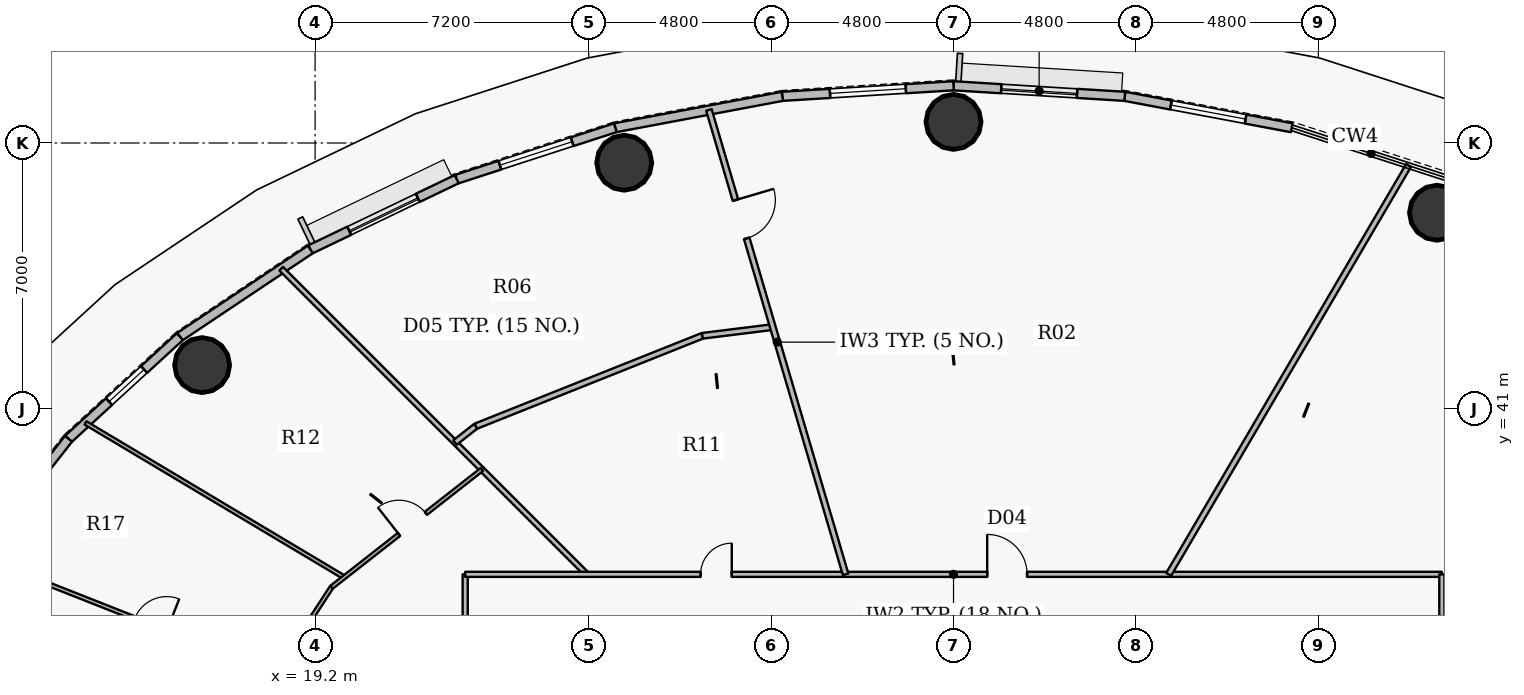
"""IFC4 building model, lengths in metres.
Left out: names, types, materials, properties, quantities, classifications, styles, units other than length and angle.
Written with IfcOpenShell. Run it as: python <this file> out.ifc"""

import sys

from ifc_helpers import new_model, si_unit, direction, frame, frame_2d, origin, origin_2d, place, context, subcontext, project, spatial, rectangle, hollow_circle, extrude, source, transform, mapped, element, fill, save


model = new_model("IFC4")
c1 = context("Model", 3, precision=1e-05, world=origin(), true_north=direction((0.0, 1.0)))
c2 = subcontext(c1, "Body", "Model", "MODEL_VIEW")
j1 = project(units=[si_unit("LENGTHUNIT", "METRE"), si_unit("PLANEANGLEUNIT", "RADIAN")], contexts=[c1])
p1 = place(None, origin())
s1 = spatial("IfcSite", under=j1, at=p1, CompositionType="ELEMENT")
p2 = place(p1, origin())
s2 = spatial("IfcBuilding", under=s1, at=p2, CompositionType="ELEMENT")
p3 = place(p2, frame((0.0, 0.0, 92.4)))
s3 = spatial("IfcBuildingStorey", under=s2, at=p3, CompositionType="ELEMENT", Elevation=92.4)
for number, where, z_axis, x_axis in (
    (1, (48.722, 46.165, -0.3), (0.0, 0.0, 1.0), (1.0, 0.0, 0.0)),
    (2, (36.0, 48.555, -0.3), (0.0, 0.0, 1.0), (1.0, 0.0, 0.0)),
    (3, (27.334, 47.481, -0.3), (0.0, 0.0, 1.0), (1.0, 0.0, 0.0)),
    (4, (16.227, 42.156, -0.3), (0.0, 0.0, 1.0), (1.0, 0.0, 0.0)),
):
    element("IfcColumn", number, at=place(p3, frame(where, z_axis=z_axis, x_axis=x_axis)), inside=s3, PredefinedType="COLUMN", context=c2, shape_type="SweptSolid", body=[
        extrude(hollow_circle(Radius=0.725, WallThickness=0.042, at=origin_2d()), origin(), (0.0, 0.0, 1.0), 5.1),
    ])
p4 = place(p3, frame((40.506, 49.227, 0.0), z_axis=(0.0, 0.0, 1.0), x_axis=(0.982789252177, -0.184730305596, 0.0)))
e5 = element("IfcWall", 5, at=p4, inside=s3, PredefinedType="SOLIDWALL", context=c2, shape_type="SweptSolid", body=[
    extrude(rectangle(XDim=4.471, YDim=0.24, at=frame_2d((2.235, 0.0))), origin(), (0.0, 0.0, 1.0), 4.55),
])
p5 = place(p4, frame((1.236, 0.0, 0.9)))
e6 = element("IfcOpeningElement", 6, at=p5, cuts=e5, PredefinedType="OPENING", context=c2, shape_type="SweptSolid", body=[
    extrude(rectangle(XDim=2.0, YDim=1.75, at=origin_2d()), frame((1.0, 0.13, 0.875), z_axis=(0.0, -1.0, 0.0), x_axis=(1.0, 0.0, 0.0)), (0.0, 0.0, 1.0), 0.26),
])
p6 = place(p3, frame((36.0, 49.505, 0.0), z_axis=(0.0, 0.0, 1.0), x_axis=(0.998107531589, -0.061492726276, 0.0)))
e7 = element("IfcWall", 7, at=p6, inside=s3, PredefinedType="SOLIDWALL", context=c2, shape_type="SweptSolid", body=[
    extrude(rectangle(XDim=4.514, YDim=0.24, at=frame_2d((2.257, 0.0))), origin(), (0.0, 0.0, 1.0), 4.55),
])
p7 = place(p6, frame((1.257, 0.0, 0.9)))
e8 = element("IfcOpeningElement", 8, at=p7, cuts=e7, PredefinedType="OPENING", context=c2, shape_type="SweptSolid", body=[
    extrude(rectangle(XDim=2.0, YDim=1.75, at=origin_2d()), frame((1.0, 0.13, 0.875), z_axis=(0.0, -1.0, 0.0), x_axis=(1.0, 0.0, 0.0)), (0.0, 0.0, 1.0), 0.26),
])
p8 = place(p3, frame((31.494, 49.227, 0.0), z_axis=(0.0, 0.0, 1.0), x_axis=(0.998107531589, 0.061492726276, 0.0)))
e9 = element("IfcWall", 9, at=p8, inside=s3, PredefinedType="SOLIDWALL", context=c2, shape_type="SweptSolid", body=[
    extrude(rectangle(XDim=4.514, YDim=0.24, at=frame_2d((2.257, 0.0))), origin(), (0.0, 0.0, 1.0), 4.55),
])
p9 = place(p8, frame((1.257, 0.0, 0.9)))
e10 = element("IfcOpeningElement", 10, at=p9, cuts=e9, PredefinedType="OPENING", context=c2, shape_type="SweptSolid", body=[
    extrude(rectangle(XDim=2.0, YDim=1.75, at=origin_2d()), frame((1.0, 0.13, 0.875), z_axis=(0.0, -1.0, 0.0), x_axis=(1.0, 0.0, 0.0)), (0.0, 0.0, 1.0), 0.26),
])
p10 = place(p3, frame((27.1, 48.401, 0.0), z_axis=(0.0, 0.0, 1.0), x_axis=(0.982789252177, 0.184730305596, 0.0)))
e11 = element("IfcWall", 11, at=p10, inside=s3, PredefinedType="SOLIDWALL", context=c2, shape_type="SweptSolid", body=[
    extrude(rectangle(XDim=4.471, YDim=0.24, at=frame_2d((2.235, 0.0))), origin(), (0.0, 0.0, 1.0), 4.55),
])
p11 = place(p3, frame((22.926, 47.047, 0.0), z_axis=(0.0, 0.0, 1.0), x_axis=(0.951211346073, 0.308540070495, 0.0)))
e12 = element("IfcWall", 12, at=p11, inside=s3, PredefinedType="SOLIDWALL", context=c2, shape_type="SweptSolid", body=[
    extrude(rectangle(XDim=4.388, YDim=0.24, at=frame_2d((2.194, 0.0))), origin(), (0.0, 0.0, 1.0), 4.55),
])
p12 = place(p11, frame((1.194, 0.0, 0.9)))
e13 = element("IfcOpeningElement", 13, at=p12, cuts=e12, PredefinedType="OPENING", context=c2, shape_type="SweptSolid", body=[
    extrude(rectangle(XDim=2.0, YDim=1.75, at=origin_2d()), frame((1.0, 0.13, 0.875), z_axis=(0.0, -1.0, 0.0), x_axis=(1.0, 0.0, 0.0)), (0.0, 0.0, 1.0), 0.26),
])
p13 = place(p3, frame((19.075, 45.199, 0.0), z_axis=(0.0, 0.0, 1.0), x_axis=(0.901589935876, 0.432591709962, 0.0)))
e14 = element("IfcWall", 14, at=p13, inside=s3, PredefinedType="SOLIDWALL", context=c2, shape_type="SweptSolid", body=[
    extrude(rectangle(XDim=4.272, YDim=0.24, at=frame_2d((2.136, 0.0))), origin(), (0.0, 0.0, 1.0), 4.55),
])
p14 = place(p13, frame((1.136, 0.0, 0.9)))
e15 = element("IfcOpeningElement", 15, at=p14, cuts=e14, PredefinedType="OPENING", context=c2, shape_type="SweptSolid", body=[
    extrude(rectangle(XDim=2.0, YDim=1.75, at=origin_2d()), frame((1.0, 0.13, 0.875), z_axis=(0.0, -1.0, 0.0), x_axis=(1.0, 0.0, 0.0)), (0.0, 0.0, 1.0), 0.26),
])
p15 = place(p3, frame((15.642, 42.903, 0.0), z_axis=(0.0, 0.0, 1.0), x_axis=(0.831221811447, 0.555940914284, 0.0)))
e16 = element("IfcWall", 16, at=p15, inside=s3, PredefinedType="SOLIDWALL", context=c2, shape_type="SweptSolid", body=[
    extrude(rectangle(XDim=4.13, YDim=0.24, at=frame_2d((2.065, 0.0))), origin(), (0.0, 0.0, 1.0), 4.55),
])
p16 = place(p3, frame((12.711, 40.217, 0.0), z_axis=(0.0, 0.0, 1.0), x_axis=(0.737113356241, 0.675769117414, 0.0)))
e17 = element("IfcWall", 17, at=p16, inside=s3, PredefinedType="SOLIDWALL", context=c2, shape_type="SweptSolid", body=[
    extrude(rectangle(XDim=3.976, YDim=0.24, at=frame_2d((1.988, 0.0))), origin(), (0.0, 0.0, 1.0), 4.55),
])
p17 = place(p16, frame((1.447, 0.0, 0.9)))
e18 = element("IfcOpeningElement", 18, at=p17, cuts=e17, PredefinedType="OPENING", context=c2, shape_type="SweptSolid", body=[
    extrude(rectangle(XDim=1.25, YDim=1.65, at=origin_2d()), frame((0.625, 0.13, 0.825), z_axis=(0.0, -1.0, 0.0), x_axis=(1.0, 0.0, 0.0)), (0.0, 0.0, 1.0), 0.26),
])
p18 = place(p3, frame((10.355, 37.206, 0.0), z_axis=(0.0, 0.0, 1.0), x_axis=(0.616272103517, 0.787533297345, 0.0)))
e19 = element("IfcWall", 19, at=p18, inside=s3, PredefinedType="SOLIDWALL", context=c2, shape_type="SweptSolid", body=[
    extrude(rectangle(XDim=3.823, YDim=0.24, at=frame_2d((1.912, 0.0))), origin(), (0.0, 0.0, 1.0), 4.55),
])
p19 = place(p3, frame((10.309, 37.131, 0.0), z_axis=(0.0, 0.0, 1.0), x_axis=(0.930286568853, -0.366833613251, 0.0)))
e20 = element("IfcWall", 20, at=p19, inside=s3, PredefinedType="PARTITIONING", context=c2, shape_type="SweptSolid", body=[
    extrude(rectangle(XDim=8.432, YDim=0.1, at=frame_2d((4.216, 0.0))), origin(), (0.0, 0.0, 1.0), 3.985),
])
p20 = place(p19, frame((4.459, 0.0, 0.0)))
e21 = element("IfcOpeningElement", 21, at=p20, cuts=e20, PredefinedType="OPENING", context=c2, shape_type="SweptSolid", body=[
    extrude(rectangle(XDim=0.9, YDim=2.1, at=origin_2d()), frame((0.45, 0.06, 1.05), z_axis=(0.0, -1.0, 0.0), x_axis=(1.0, 0.0, 0.0)), (0.0, 0.0, 1.0), 0.12),
])
p21 = place(p3, frame((13.159, 40.634, 0.0), z_axis=(0.0, 0.0, 1.0), x_axis=(0.858651150201, -0.512560437664, 0.0)))
e22 = element("IfcWall", 22, at=p21, inside=s3, PredefinedType="PARTITIONING", context=c2, shape_type="SweptSolid", body=[
    extrude(rectangle(XDim=7.927, YDim=0.1, at=frame_2d((3.963, 0.0))), origin(), (0.0, 0.0, 1.0), 3.985),
])
p22 = place(p3, frame((18.154, 34.037, 0.0), z_axis=(0.0, 0.0, 1.0), x_axis=(0.545361556746, 0.838200914115, 0.0)))
e23 = element("IfcWall", 23, at=p22, inside=s3, PredefinedType="PARTITIONING", context=c2, shape_type="SweptSolid", body=[
    extrude(rectangle(XDim=2.713, YDim=0.1, at=frame_2d((1.356, 0.0))), origin(), (0.0, 0.0, 1.0), 3.985),
])
p23 = place(p3, frame((18.308, 44.692, 0.0), z_axis=(0.0, 0.0, 1.0), x_axis=(0.707106781187, -0.707106781187, 0.0)))
e24 = element("IfcWall", 24, at=p23, inside=s3, PredefinedType="PARTITIONING", context=c2, shape_type="SweptSolid", body=[
    extrude(rectangle(XDim=11.374, YDim=0.135, at=frame_2d((5.687, 0.0))), origin(), (0.0, 0.0, 1.0), 3.985),
])
p24 = place(p3, frame((19.634, 36.311, 0.0), z_axis=(0.0, 0.0, 1.0), x_axis=(0.787333773608, 0.616526989625, 0.0)))
e25 = element("IfcWall", 25, at=p24, inside=s3, PredefinedType="PARTITIONING", context=c2, shape_type="SweptSolid", body=[
    extrude(rectangle(XDim=5.026, YDim=0.1, at=frame_2d((2.513, 0.0))), origin(), (0.0, 0.0, 1.0), 3.985),
])
p25 = place(p24, frame((2.254, 0.0, 0.0)))
e26 = element("IfcOpeningElement", 26, at=p25, cuts=e25, PredefinedType="OPENING", context=c2, shape_type="SweptSolid", body=[
    extrude(rectangle(XDim=0.9, YDim=2.1, at=origin_2d()), frame((0.45, 0.06, 1.05), z_axis=(0.0, -1.0, 0.0), x_axis=(1.0, 0.0, 0.0)), (0.0, 0.0, 1.0), 0.12),
])
p26 = place(p3, frame((22.881, 40.119, 0.0), z_axis=(0.0, 0.0, 1.0), x_axis=(0.787460608079, 0.616364981747, 0.0)))
e27 = element("IfcWall", 27, at=p26, inside=s3, PredefinedType="PARTITIONING", context=c2, shape_type="SweptSolid", body=[
    extrude(rectangle(XDim=0.696, YDim=0.15, at=frame_2d((0.348, 0.0))), origin(), (0.0, 0.0, 1.0), 4.55),
])
p27 = place(p3, frame((23.15, 17.35, 0.0), z_axis=(0.0, 0.0, 1.0), x_axis=(0.0, 1.0, 0.0)))
e28 = element("IfcWall", 28, at=p27, inside=s3, PredefinedType="PARTITIONING", context=c2, shape_type="SweptSolid", body=[
    extrude(rectangle(XDim=19.3, YDim=0.135, at=frame_2d((9.65, 0.0))), origin(), (0.0, 0.0, 1.0), 3.985),
])
p28 = place(p27, frame((10.899, 0.0, 0.0)))
e29 = element("IfcOpeningElement", 29, at=p28, cuts=e28, PredefinedType="OPENING", context=c2, shape_type="SweptSolid", body=[
    extrude(rectangle(XDim=1.0, YDim=2.15, at=origin_2d()), frame((0.5, 0.078, 1.075), z_axis=(0.0, -1.0, 0.0), x_axis=(1.0, 0.0, 0.0)), (0.0, 0.0, 1.0), 0.155),
])
p29 = place(p3, frame((23.15, 36.65, 0.0), z_axis=(0.0, 0.0, 1.0), x_axis=(1.0, 0.0, 0.0)))
e30 = element("IfcWall", 30, at=p29, inside=s3, PredefinedType="PARTITIONING", context=c2, shape_type="SweptSolid", body=[
    extrude(rectangle(XDim=25.7, YDim=0.135, at=frame_2d((12.85, 0.0))), origin(), (0.0, 0.0, 1.0), 3.985),
])
p30 = place(p29, frame((13.736, 0.0, 0.0)))
e31 = element("IfcOpeningElement", 31, at=p30, cuts=e30, PredefinedType="OPENING", context=c2, shape_type="SweptSolid", body=[
    extrude(rectangle(XDim=1.05, YDim=2.15, at=origin_2d()), frame((0.525, 0.078, 1.075), z_axis=(0.0, -1.0, 0.0), x_axis=(1.0, 0.0, 0.0)), (0.0, 0.0, 1.0), 0.155),
])
p31 = place(p29, frame((6.195, 0.0, 0.0)))
e32 = element("IfcOpeningElement", 32, at=p31, cuts=e30, PredefinedType="OPENING", context=c2, shape_type="SweptSolid", body=[
    extrude(rectangle(XDim=0.82, YDim=2.1, at=origin_2d()), frame((0.41, 0.078, 1.05), z_axis=(0.0, -1.0, 0.0), x_axis=(1.0, 0.0, 0.0)), (0.0, 0.0, 1.0), 0.155),
])
p32 = place(p3, frame((23.43, 40.548, 0.0), z_axis=(0.0, 0.0, 1.0), x_axis=(0.928798989983, 0.370583912503, 0.0)))
e33 = element("IfcWall", 33, at=p32, inside=s3, PredefinedType="PARTITIONING", context=c2, shape_type="SweptSolid", body=[
    extrude(rectangle(XDim=6.419, YDim=0.15, at=frame_2d((3.209, 0.0))), origin(), (0.0, 0.0, 1.0), 3.985),
])
p33 = place(p3, frame((29.391, 42.927, 0.0), z_axis=(0.0, 0.0, 1.0), x_axis=(0.992390083923, 0.123133753827, 0.0)))
e34 = element("IfcWall", 34, at=p33, inside=s3, PredefinedType="PARTITIONING", context=c2, shape_type="SweptSolid", body=[
    extrude(rectangle(XDim=1.868, YDim=0.15, at=frame_2d((0.934, 0.0))), origin(), (0.0, 0.0, 1.0), 3.985),
])
p34 = place(p3, frame((29.563, 48.869, 0.0), z_axis=(0.0, 0.0, 1.0), x_axis=(0.282349992993, -0.959311462173, 0.0)))
e35 = element("IfcWall", 35, at=p34, inside=s3, PredefinedType="PARTITIONING", context=c2, shape_type="SweptSolid", body=[
    extrude(rectangle(XDim=12.738, YDim=0.15, at=frame_2d((6.369, 0.0))), origin(), (0.0, 0.0, 1.0), 3.985),
])
p35 = place(p34, frame((2.473, 0.0, 0.0)))
e36 = element("IfcOpeningElement", 36, at=p35, cuts=e35, PredefinedType="OPENING", context=c2, shape_type="SweptSolid", body=[
    extrude(rectangle(XDim=1.05, YDim=2.15, at=origin_2d()), frame((0.525, 0.085, 1.075), z_axis=(0.0, -1.0, 0.0), x_axis=(1.0, 0.0, 0.0)), (0.0, 0.0, 1.0), 0.17),
])
p36 = place(p3, frame((41.662, 36.65, 0.0), z_axis=(0.0, 0.0, 1.0), x_axis=(0.506029365316, 0.862516249956, 0.0)))
e37 = element("IfcWall", 37, at=p36, inside=s3, PredefinedType="PARTITIONING", context=c2, shape_type="SweptSolid", body=[
    extrude(rectangle(XDim=12.475, YDim=0.15, at=frame_2d((6.237, 0.0))), origin(), (0.0, 0.0, 1.0), 3.985),
])
p37 = place(p3, frame((48.85, 17.35, 0.0), z_axis=(0.0, 0.0, 1.0), x_axis=(0.0, 1.0, 0.0)))
e38 = element("IfcWall", 38, at=p37, inside=s3, PredefinedType="PARTITIONING", context=c2, shape_type="SweptSolid", body=[
    extrude(rectangle(XDim=19.3, YDim=0.135, at=frame_2d((9.65, 0.0))), origin(), (0.0, 0.0, 1.0), 3.985),
])
p38 = place(p37, frame((4.907, 0.0, 0.0)))
e39 = element("IfcOpeningElement", 39, at=p38, cuts=e38, PredefinedType="OPENING", context=c2, shape_type="SweptSolid", body=[
    extrude(rectangle(XDim=1.0, YDim=2.15, at=origin_2d()), frame((0.5, 0.078, 1.075), z_axis=(0.0, -1.0, 0.0), x_axis=(1.0, 0.0, 0.0)), (0.0, 0.0, 1.0), 0.155),
])
p39 = place(p37, frame((14.492, 0.0, 0.0)))
e40 = element("IfcOpeningElement", 40, at=p39, cuts=e38, PredefinedType="OPENING", context=c2, shape_type="SweptSolid", body=[
    extrude(rectangle(XDim=1.05, YDim=2.15, at=origin_2d()), frame((0.525, 0.078, 1.075), z_axis=(0.0, -1.0, 0.0), x_axis=(1.0, 0.0, 0.0)), (0.0, 0.0, 1.0), 0.155),
])
m1 = source(origin(), c2, "Body", "SweptSolid", [
    extrude(rectangle(XDim=2.0, YDim=1.75, at=origin_2d()), frame((1.0, 0.03, 0.875), z_axis=(0.0, -1.0, 0.0), x_axis=(1.0, 0.0, 0.0)), (0.0, 0.0, 1.0), 0.06),
])
p40 = place(p5, origin())
e41 = element("IfcWindow", 41, at=p40, inside=s3, PartitioningType="DOUBLE_PANEL_VERTICAL", PredefinedType="WINDOW", context=c2, shape_type="MappedRepresentation", body=[
    mapped(m1, transform((0.0, 0.0, 0.0), x_axis=(1.0, 0.0, 0.0), y_axis=(0.0, 1.0, 0.0), z_axis=(0.0, 0.0, 1.0), scale=1.0)),
])
fill(e6, e41)
p41 = place(p7, origin())
e42 = element("IfcWindow", 42, at=p41, inside=s3, PartitioningType="DOUBLE_PANEL_VERTICAL", PredefinedType="WINDOW", context=c2, shape_type="MappedRepresentation", body=[
    mapped(m1, transform((0.0, 0.0, 0.0), x_axis=(1.0, 0.0, 0.0), y_axis=(0.0, 1.0, 0.0), z_axis=(0.0, 0.0, 1.0), scale=1.0)),
])
fill(e8, e42)
p42 = place(p9, origin())
e43 = element("IfcWindow", 43, at=p42, inside=s3, PartitioningType="DOUBLE_PANEL_VERTICAL", PredefinedType="WINDOW", context=c2, shape_type="MappedRepresentation", body=[
    mapped(m1, transform((0.0, 0.0, 0.0), x_axis=(1.0, 0.0, 0.0), y_axis=(0.0, 1.0, 0.0), z_axis=(0.0, 0.0, 1.0), scale=1.0)),
])
fill(e10, e43)
p43 = place(p12, origin())
e44 = element("IfcWindow", 44, at=p43, inside=s3, PartitioningType="DOUBLE_PANEL_VERTICAL", PredefinedType="WINDOW", context=c2, shape_type="MappedRepresentation", body=[
    mapped(m1, transform((0.0, 0.0, 0.0), x_axis=(1.0, 0.0, 0.0), y_axis=(0.0, 1.0, 0.0), z_axis=(0.0, 0.0, 1.0), scale=1.0)),
])
fill(e13, e44)
p44 = place(p14, origin())
e45 = element("IfcWindow", 45, at=p44, inside=s3, PartitioningType="DOUBLE_PANEL_VERTICAL", PredefinedType="WINDOW", context=c2, shape_type="MappedRepresentation", body=[
    mapped(m1, transform((0.0, 0.0, 0.0), x_axis=(1.0, 0.0, 0.0), y_axis=(0.0, 1.0, 0.0), z_axis=(0.0, 0.0, 1.0), scale=1.0)),
])
fill(e15, e45)
m2 = source(origin(), c2, "Body", "SweptSolid", [
    extrude(rectangle(XDim=1.25, YDim=1.65, at=origin_2d()), frame((0.625, 0.03, 0.825), z_axis=(0.0, -1.0, 0.0), x_axis=(1.0, 0.0, 0.0)), (0.0, 0.0, 1.0), 0.06),
])
p45 = place(p17, origin())
e46 = element("IfcWindow", 46, at=p45, inside=s3, PartitioningType="SINGLE_PANEL", PredefinedType="WINDOW", context=c2, shape_type="MappedRepresentation", body=[
    mapped(m2, transform((0.0, 0.0, 0.0), x_axis=(1.0, 0.0, 0.0), y_axis=(0.0, 1.0, 0.0), z_axis=(0.0, 0.0, 1.0), scale=1.0)),
])
fill(e18, e46)
m3 = source(origin(), c2, "Body", "SweptSolid", [
    extrude(rectangle(XDim=0.9, YDim=2.1, at=origin_2d()), frame((0.45, 0.025, 1.05), z_axis=(0.0, -1.0, 0.0), x_axis=(1.0, 0.0, 0.0)), (0.0, 0.0, 1.0), 0.05),
])
p46 = place(p25, origin())
e47 = element("IfcDoor", 47, at=p46, inside=s3, OperationType="SINGLE_SWING_LEFT", PredefinedType="DOOR", context=c2, shape_type="MappedRepresentation", body=[
    mapped(m3, transform((0.0, 0.0, 0.0), x_axis=(1.0, 0.0, 0.0), y_axis=(0.0, 1.0, 0.0), z_axis=(0.0, 0.0, 1.0), scale=1.0)),
])
fill(e26, e47)
m4 = source(origin(), c2, "Body", "SweptSolid", [
    extrude(rectangle(XDim=1.05, YDim=2.15, at=origin_2d()), frame((0.525, 0.025, 1.075), z_axis=(0.0, -1.0, 0.0), x_axis=(1.0, 0.0, 0.0)), (0.0, 0.0, 1.0), 0.05),
])
p47 = place(p30, origin())
e48 = element("IfcDoor", 48, at=p47, inside=s3, OperationType="SINGLE_SWING_LEFT", PredefinedType="DOOR", context=c2, shape_type="MappedRepresentation", body=[
    mapped(m4, transform((0.0, 0.0, 0.0), x_axis=(1.0, 0.0, 0.0), y_axis=(0.0, 1.0, 0.0), z_axis=(0.0, 0.0, 1.0), scale=1.0)),
])
fill(e31, e48)
m5 = source(origin(), c2, "Body", "SweptSolid", [
    extrude(rectangle(XDim=0.82, YDim=2.1, at=origin_2d()), frame((0.41, 0.025, 1.05), z_axis=(0.0, -1.0, 0.0), x_axis=(1.0, 0.0, 0.0)), (0.0, 0.0, 1.0), 0.05),
])
p48 = place(p31, origin())
e49 = element("IfcDoor", 49, at=p48, inside=s3, OperationType="SINGLE_SWING_RIGHT", PredefinedType="DOOR", context=c2, shape_type="MappedRepresentation", body=[
    mapped(m5, transform((0.0, 0.0, 0.0), x_axis=(1.0, 0.0, 0.0), y_axis=(0.0, 1.0, 0.0), z_axis=(0.0, 0.0, 1.0), scale=1.0)),
])
fill(e32, e49)
p49 = place(p35, origin())
e50 = element("IfcDoor", 50, at=p49, inside=s3, OperationType="SINGLE_SWING_LEFT", PredefinedType="DOOR", context=c2, shape_type="MappedRepresentation", body=[
    mapped(m4, transform((0.0, 0.0, 0.0), x_axis=(1.0, 0.0, 0.0), y_axis=(0.0, 1.0, 0.0), z_axis=(0.0, 0.0, 1.0), scale=1.0)),
])
fill(e36, e50)
save(model, sys.argv[1])
